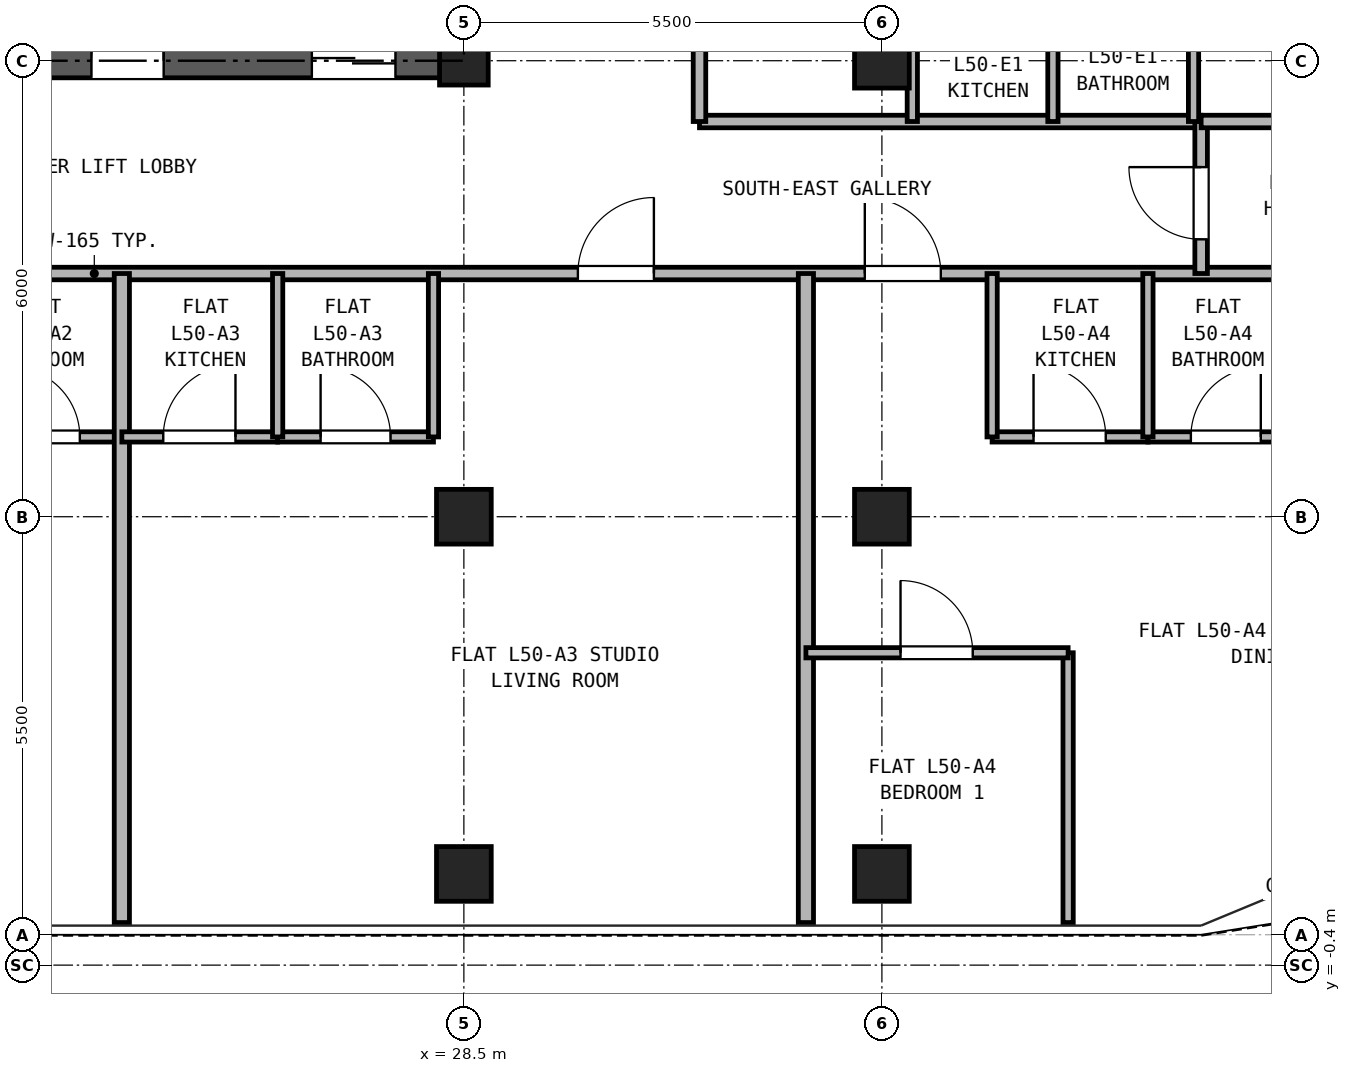
"""IFC4 building model, lengths in metres.
Left out: names, types, materials, properties, quantities, classifications, styles, units other than length and angle.
Written with IfcOpenShell. Run it as: python <this file> out.ifc"""

import sys

from ifc_helpers import new_model, si_unit, direction, frame, frame_2d, origin, origin_2d, place, context, subcontext, project, spatial, rectangle, hollow_rectangle, extrude, source, transform, mapped, element, fill, save


model = new_model("IFC4")
c1 = context("Model", 3, precision=1e-05, world=origin(), true_north=direction((0.0, 1.0)))
c2 = subcontext(c1, "Body", "Model", "MODEL_VIEW")
j1 = project(units=[si_unit("LENGTHUNIT", "METRE"), si_unit("PLANEANGLEUNIT", "RADIAN")], contexts=[c1])
p1 = place(None, origin())
s1 = spatial("IfcSite", under=j1, at=p1, CompositionType="ELEMENT")
p2 = place(p1, origin())
s2 = spatial("IfcBuilding", under=s1, at=p2, CompositionType="ELEMENT")
p3 = place(p2, frame((0.0, 0.0, 178.5)))
s3 = spatial("IfcBuildingStorey", under=s2, at=p3, CompositionType="ELEMENT", Elevation=178.5)
m1 = source(origin(), c2, "Body", "SweptSolid", [
    extrude(hollow_rectangle(XDim=0.72, YDim=0.72, WallThickness=0.04, at=origin_2d()), origin(), (0.0, 0.0, 1.0), 2.95),
])
for number, where, z_axis, x_axis in (
    (1, (28.5, 0.8, 0.0), (0.0, 0.0, 1.0), (1.0, 0.0, 0.0)),
    (2, (34.0, 0.8, 0.0), (0.0, 0.0, 1.0), (1.0, 0.0, 0.0)),
    (3, (28.5, 5.5, 0.0), (0.0, 0.0, 1.0), (1.0, 0.0, 0.0)),
):
    element("IfcColumn", number, at=place(p3, frame(where, z_axis=z_axis, x_axis=x_axis)), inside=s3, PredefinedType="COLUMN", context=c2, shape_type="MappedRepresentation", body=[
        mapped(m1, transform((0.0, 0.0, 0.0), x_axis=(1.0, 0.0, 0.0), y_axis=(0.0, 1.0, 0.0), z_axis=(0.0, 0.0, 1.0), scale=1.0)),
    ])
m2 = source(origin(), c2, "Body", "SweptSolid", [
    extrude(hollow_rectangle(XDim=0.64, YDim=0.64, WallThickness=0.035, at=origin_2d()), origin(), (0.0, 0.0, 1.0), 2.95),
])
p4 = place(p3, frame((28.5, 11.5, 0.0), z_axis=(0.0, 0.0, 1.0), x_axis=(1.0, 0.0, 0.0)))
e4 = element("IfcColumn", 4, at=p4, inside=s3, PredefinedType="COLUMN", context=c2, shape_type="MappedRepresentation", body=[
    mapped(m2, transform((0.0, 0.0, 0.0), x_axis=(1.0, 0.0, 0.0), y_axis=(0.0, 1.0, 0.0), z_axis=(0.0, 0.0, 1.0), scale=1.0)),
])
for number, where, z_axis, x_axis in (
    (5, (34.0, 5.5, 0.0), (0.0, 0.0, 1.0), (1.0, 0.0, 0.0)),
    (6, (34.0, 11.5, 0.0), (0.0, 0.0, 1.0), (1.0, 0.0, 0.0)),
):
    element("IfcColumn", number, at=place(p3, frame(where, z_axis=z_axis, x_axis=x_axis)), inside=s3, PredefinedType="COLUMN", context=c2, shape_type="MappedRepresentation", body=[
        mapped(m1, transform((0.0, 0.0, 0.0), x_axis=(1.0, 0.0, 0.0), y_axis=(0.0, 1.0, 0.0), z_axis=(0.0, 0.0, 1.0), scale=1.0)),
    ])
p5 = place(p3, frame((18.275, 11.5, 0.0), z_axis=(0.0, 0.0, 1.0), x_axis=(1.0, 0.0, 0.0)))
e7 = element("IfcWall", 7, at=p5, inside=s3, PredefinedType="SHEAR", context=c2, shape_type="SweptSolid", body=[
    extrude(rectangle(XDim=10.45, YDim=0.45, at=frame_2d((5.225, 0.0))), origin(), (0.0, 0.0, 1.0), 2.95),
])
p6 = place(p5, frame((1.825, 0.0, 0.0)))
e8 = element("IfcOpeningElement", 8, at=p6, cuts=e7, PredefinedType="OPENING", context=c2, shape_type="SweptSolid", body=[
    extrude(rectangle(XDim=0.95, YDim=2.15, at=frame_2d((0.475, 1.075))), frame((0.0, 0.235, 0.0), z_axis=(0.0, -1.0, 0.0), x_axis=(1.0, 0.0, 0.0)), (0.0, 0.0, 1.0), 0.47),
])
p7 = place(p5, frame((5.325, 0.0, 0.0)))
e9 = element("IfcOpeningElement", 9, at=p7, cuts=e7, PredefinedType="OPENING", context=c2, shape_type="SweptSolid", body=[
    extrude(rectangle(XDim=0.95, YDim=2.15, at=frame_2d((0.475, 1.075))), frame((0.0, 0.235, 0.0), z_axis=(0.0, -1.0, 0.0), x_axis=(1.0, 0.0, 0.0)), (0.0, 0.0, 1.0), 0.47),
])
p8 = place(p5, frame((8.225, 0.0, 0.0)))
e10 = element("IfcOpeningElement", 10, at=p8, cuts=e7, PredefinedType="OPENING", context=c2, shape_type="SweptSolid", body=[
    extrude(rectangle(XDim=1.1, YDim=2.25, at=frame_2d((0.55, 1.125))), frame((0.0, 0.235, 0.0), z_axis=(0.0, -1.0, 0.0), x_axis=(1.0, 0.0, 0.0)), (0.0, 0.0, 1.0), 0.47),
])
p9 = place(p3, frame((0.16, 8.7, 0.0), z_axis=(0.0, 0.0, 1.0), x_axis=(1.0, 0.0, 0.0)))
e11 = element("IfcWall", 11, at=p9, inside=s3, PredefinedType="PARTITIONING", context=c2, shape_type="SweptSolid", body=[
    extrude(rectangle(XDim=41.48, YDim=0.165, at=frame_2d((20.74, 0.0))), origin(), (0.0, 0.0, 1.0), 2.583),
])
p10 = place(p9, frame((11.815, 0.0, 0.0)))
e12 = element("IfcOpeningElement", 12, at=p10, cuts=e11, PredefinedType="OPENING", context=c2, shape_type="SweptSolid", body=[
    extrude(rectangle(XDim=1.0, YDim=2.15, at=frame_2d((0.5, 1.075))), frame((0.0, 0.093, 0.0), z_axis=(0.0, -1.0, 0.0), x_axis=(1.0, 0.0, 0.0)), (0.0, 0.0, 1.0), 0.185),
])
p11 = place(p9, frame((16.115, 0.0, 0.0)))
e13 = element("IfcOpeningElement", 13, at=p11, cuts=e11, PredefinedType="OPENING", context=c2, shape_type="SweptSolid", body=[
    extrude(rectangle(XDim=1.0, YDim=2.15, at=frame_2d((0.5, 1.075))), frame((0.0, 0.093, 0.0), z_axis=(0.0, -1.0, 0.0), x_axis=(1.0, 0.0, 0.0)), (0.0, 0.0, 1.0), 0.185),
])
p12 = place(p9, frame((29.84, 0.0, 0.0)))
e14 = element("IfcOpeningElement", 14, at=p12, cuts=e11, PredefinedType="OPENING", context=c2, shape_type="SweptSolid", body=[
    extrude(rectangle(XDim=1.0, YDim=2.15, at=frame_2d((0.5, 1.075))), frame((0.0, 0.093, 0.0), z_axis=(0.0, -1.0, 0.0), x_axis=(1.0, 0.0, 0.0)), (0.0, 0.0, 1.0), 0.185),
])
p13 = place(p9, frame((33.615, 0.0, 0.0)))
e15 = element("IfcOpeningElement", 15, at=p13, cuts=e11, PredefinedType="OPENING", context=c2, shape_type="SweptSolid", body=[
    extrude(rectangle(XDim=1.0, YDim=2.15, at=frame_2d((0.5, 1.075))), frame((0.0, 0.093, 0.0), z_axis=(0.0, -1.0, 0.0), x_axis=(1.0, 0.0, 0.0)), (0.0, 0.0, 1.0), 0.185),
])
p14 = place(p3, frame((31.6, 10.7, 0.0), z_axis=(0.0, 0.0, 1.0), x_axis=(1.0, 0.0, 0.0)))
e16 = element("IfcWall", 16, at=p14, inside=s3, PredefinedType="PARTITIONING", context=c2, shape_type="SweptSolid", body=[
    extrude(rectangle(XDim=6.6, YDim=0.165, at=frame_2d((3.3, 0.0))), origin(), (0.0, 0.0, 1.0), 2.95),
])
p15 = place(p3, frame((38.2, 8.7, 0.0), z_axis=(0.0, 0.0, 1.0), x_axis=(0.0, 1.0, 0.0)))
e17 = element("IfcWall", 17, at=p15, inside=s3, PredefinedType="PARTITIONING", context=c2, shape_type="SweptSolid", body=[
    extrude(rectangle(XDim=2.0, YDim=0.165, at=frame_2d((1.0, 0.0))), origin(), (0.0, 0.0, 1.0), 2.95),
])
p16 = place(p15, frame((0.45, 0.0, 0.0)))
e18 = element("IfcOpeningElement", 18, at=p16, cuts=e17, PredefinedType="OPENING", context=c2, shape_type="SweptSolid", body=[
    extrude(rectangle(XDim=0.95, YDim=2.15, at=frame_2d((0.475, 1.075))), frame((0.0, 0.093, 0.0), z_axis=(0.0, -1.0, 0.0), x_axis=(1.0, 0.0, 0.0)), (0.0, 0.0, 1.0), 0.185),
])
p17 = place(p3, frame((31.6, 10.7, 0.0), z_axis=(0.0, 0.0, 1.0), x_axis=(0.0, 1.0, 0.0)))
e19 = element("IfcWall", 19, at=p17, inside=s3, PredefinedType="PARTITIONING", context=c2, shape_type="SweptSolid", body=[
    extrude(rectangle(XDim=24.44, YDim=0.165, at=frame_2d((12.22, 0.0))), origin(), (0.0, 0.0, 1.0), 2.95),
])
p18 = place(p17, frame((3.25, 0.0, 0.0)))
e20 = element("IfcOpeningElement", 20, at=p18, cuts=e19, PredefinedType="OPENING", context=c2, shape_type="SweptSolid", body=[
    extrude(rectangle(XDim=1.0, YDim=2.15, at=frame_2d((0.5, 1.075))), frame((0.0, 0.093, 0.0), z_axis=(0.0, -1.0, 0.0), x_axis=(1.0, 0.0, 0.0)), (0.0, 0.0, 1.0), 0.185),
])
p19 = place(p17, frame((11.15, 0.0, 0.0)))
e21 = element("IfcOpeningElement", 21, at=p19, cuts=e19, PredefinedType="OPENING", context=c2, shape_type="SweptSolid", body=[
    extrude(rectangle(XDim=1.0, YDim=2.15, at=frame_2d((0.5, 1.075))), frame((0.0, 0.093, 0.0), z_axis=(0.0, -1.0, 0.0), x_axis=(1.0, 0.0, 0.0)), (0.0, 0.0, 1.0), 0.185),
])
p20 = place(p17, frame((17.7, 0.0, 0.0)))
e22 = element("IfcOpeningElement", 22, at=p20, cuts=e19, PredefinedType="OPENING", context=c2, shape_type="SweptSolid", body=[
    extrude(rectangle(XDim=1.0, YDim=2.15, at=frame_2d((0.5, 1.075))), frame((0.0, 0.093, 0.0), z_axis=(0.0, -1.0, 0.0), x_axis=(1.0, 0.0, 0.0)), (0.0, 0.0, 1.0), 0.185),
])
p21 = place(p3, frame((21.975, 6.55, 0.0), z_axis=(0.0, 0.0, 1.0), x_axis=(1.0, 0.0, 0.0)))
e23 = element("IfcWall", 23, at=p21, inside=s3, PredefinedType="PARTITIONING", context=c2, shape_type="SweptSolid", body=[
    extrude(rectangle(XDim=2.025, YDim=0.135, at=frame_2d((1.012, 0.0))), origin(), (0.0, 0.0, 1.0), 2.95),
])
p22 = place(p21, frame((0.552, 0.0, 0.0)))
e24 = element("IfcOpeningElement", 24, at=p22, cuts=e23, PredefinedType="OPENING", context=c2, shape_type="SweptSolid", body=[
    extrude(rectangle(XDim=0.92, YDim=2.1, at=frame_2d((0.46, 1.05))), frame((0.0, 0.077, 0.0), z_axis=(0.0, -1.0, 0.0), x_axis=(1.0, 0.0, 0.0)), (0.0, 0.0, 1.0), 0.155),
])
p23 = place(p3, frame((24.0, 0.16, 0.0), z_axis=(0.0, 0.0, 1.0), x_axis=(0.0, 1.0, 0.0)))
e25 = element("IfcWall", 25, at=p23, inside=s3, PredefinedType="PARTITIONING", context=c2, shape_type="SweptSolid", body=[
    extrude(rectangle(XDim=8.54, YDim=0.2, at=frame_2d((4.27, 0.0))), origin(), (0.0, 0.0, 1.0), 2.95),
])
p24 = place(p3, frame((24.0, 6.55, 0.0), z_axis=(0.0, 0.0, 1.0), x_axis=(1.0, 0.0, 0.0)))
e26 = element("IfcWall", 26, at=p24, inside=s3, PredefinedType="PARTITIONING", context=c2, shape_type="SweptSolid", body=[
    extrude(rectangle(XDim=2.05, YDim=0.135, at=frame_2d((1.025, 0.0))), origin(), (0.0, 0.0, 1.0), 2.95),
])
p25 = place(p24, frame((0.545, 0.0, 0.0)))
e27 = element("IfcOpeningElement", 27, at=p25, cuts=e26, PredefinedType="OPENING", context=c2, shape_type="SweptSolid", body=[
    extrude(rectangle(XDim=0.95, YDim=2.15, at=frame_2d((0.475, 1.075))), frame((0.0, 0.077, 0.0), z_axis=(0.0, -1.0, 0.0), x_axis=(1.0, 0.0, 0.0)), (0.0, 0.0, 1.0), 0.155),
])
p26 = place(p3, frame((26.05, 6.55, 0.0), z_axis=(0.0, 0.0, 1.0), x_axis=(1.0, 0.0, 0.0)))
e28 = element("IfcWall", 28, at=p26, inside=s3, PredefinedType="PARTITIONING", context=c2, shape_type="SweptSolid", body=[
    extrude(rectangle(XDim=2.05, YDim=0.135, at=frame_2d((1.025, 0.0))), origin(), (0.0, 0.0, 1.0), 2.95),
])
p27 = place(p26, frame((0.565, 0.0, 0.0)))
e29 = element("IfcOpeningElement", 29, at=p27, cuts=e28, PredefinedType="OPENING", context=c2, shape_type="SweptSolid", body=[
    extrude(rectangle(XDim=0.92, YDim=2.1, at=frame_2d((0.46, 1.05))), frame((0.0, 0.077, 0.0), z_axis=(0.0, -1.0, 0.0), x_axis=(1.0, 0.0, 0.0)), (0.0, 0.0, 1.0), 0.155),
])
for number, where, z_axis, x_axis in (
    (30, (26.05, 6.55, 0.0), (0.0, 0.0, 1.0), (0.0, 1.0, 0.0)),
    (31, (28.1, 6.55, 0.0), (0.0, 0.0, 1.0), (0.0, 1.0, 0.0)),
):
    element("IfcWall", number, at=place(p3, frame(where, z_axis=z_axis, x_axis=x_axis)), inside=s3, PredefinedType="PARTITIONING", context=c2, shape_type="SweptSolid", body=[
        extrude(rectangle(XDim=2.15, YDim=0.135, at=frame_2d((1.075, 0.0))), origin(), (0.0, 0.0, 1.0), 2.95),
    ])
p28 = place(p3, frame((33.0, 0.16, 0.0), z_axis=(0.0, 0.0, 1.0), x_axis=(0.0, 1.0, 0.0)))
e32 = element("IfcWall", 32, at=p28, inside=s3, PredefinedType="PARTITIONING", context=c2, shape_type="SweptSolid", body=[
    extrude(rectangle(XDim=8.54, YDim=0.2, at=frame_2d((4.27, 0.0))), origin(), (0.0, 0.0, 1.0), 2.95),
])
p29 = place(p3, frame((35.45, 6.55, 0.0), z_axis=(0.0, 0.0, 1.0), x_axis=(1.0, 0.0, 0.0)))
e33 = element("IfcWall", 33, at=p29, inside=s3, PredefinedType="PARTITIONING", context=c2, shape_type="SweptSolid", body=[
    extrude(rectangle(XDim=2.05, YDim=0.135, at=frame_2d((1.025, 0.0))), origin(), (0.0, 0.0, 1.0), 2.95),
])
p30 = place(p29, frame((0.545, 0.0, 0.0)))
e34 = element("IfcOpeningElement", 34, at=p30, cuts=e33, PredefinedType="OPENING", context=c2, shape_type="SweptSolid", body=[
    extrude(rectangle(XDim=0.95, YDim=2.15, at=frame_2d((0.475, 1.075))), frame((0.0, 0.077, 0.0), z_axis=(0.0, -1.0, 0.0), x_axis=(1.0, 0.0, 0.0)), (0.0, 0.0, 1.0), 0.155),
])
p31 = place(p3, frame((37.5, 6.55, 0.0), z_axis=(0.0, 0.0, 1.0), x_axis=(1.0, 0.0, 0.0)))
e35 = element("IfcWall", 35, at=p31, inside=s3, PredefinedType="PARTITIONING", context=c2, shape_type="SweptSolid", body=[
    extrude(rectangle(XDim=2.05, YDim=0.135, at=frame_2d((1.025, 0.0))), origin(), (0.0, 0.0, 1.0), 2.95),
])
p32 = place(p31, frame((0.565, 0.0, 0.0)))
e36 = element("IfcOpeningElement", 36, at=p32, cuts=e35, PredefinedType="OPENING", context=c2, shape_type="SweptSolid", body=[
    extrude(rectangle(XDim=0.92, YDim=2.1, at=frame_2d((0.46, 1.05))), frame((0.0, 0.077, 0.0), z_axis=(0.0, -1.0, 0.0), x_axis=(1.0, 0.0, 0.0)), (0.0, 0.0, 1.0), 0.155),
])
for number, where, z_axis, x_axis in (
    (37, (35.45, 6.55, 0.0), (0.0, 0.0, 1.0), (0.0, 1.0, 0.0)),
    (38, (37.5, 6.55, 0.0), (0.0, 0.0, 1.0), (0.0, 1.0, 0.0)),
):
    element("IfcWall", number, at=place(p3, frame(where, z_axis=z_axis, x_axis=x_axis)), inside=s3, PredefinedType="PARTITIONING", context=c2, shape_type="SweptSolid", body=[
        extrude(rectangle(XDim=2.15, YDim=0.135, at=frame_2d((1.075, 0.0))), origin(), (0.0, 0.0, 1.0), 2.95),
    ])
p33 = place(p3, frame((36.45, 0.16, 0.0), z_axis=(0.0, 0.0, 1.0), x_axis=(0.0, 1.0, 0.0)))
e39 = element("IfcWall", 39, at=p33, inside=s3, PredefinedType="PARTITIONING", context=c2, shape_type="SweptSolid", body=[
    extrude(rectangle(XDim=3.55, YDim=0.135, at=frame_2d((1.775, 0.0))), origin(), (0.0, 0.0, 1.0), 2.95),
])
p34 = place(p3, frame((33.0, 3.71, 0.0), z_axis=(0.0, 0.0, 1.0), x_axis=(1.0, 0.0, 0.0)))
e40 = element("IfcWall", 40, at=p34, inside=s3, PredefinedType="PARTITIONING", context=c2, shape_type="SweptSolid", body=[
    extrude(rectangle(XDim=3.45, YDim=0.135, at=frame_2d((1.725, 0.0))), origin(), (0.0, 0.0, 1.0), 2.95),
])
p35 = place(p34, frame((1.245, 0.0, 0.0)))
e41 = element("IfcOpeningElement", 41, at=p35, cuts=e40, PredefinedType="OPENING", context=c2, shape_type="SweptSolid", body=[
    extrude(rectangle(XDim=0.95, YDim=2.15, at=frame_2d((0.475, 1.075))), frame((0.0, 0.077, 0.0), z_axis=(0.0, -1.0, 0.0), x_axis=(1.0, 0.0, 0.0)), (0.0, 0.0, 1.0), 0.155),
])
p36 = place(p3, frame((38.2, 10.7, 0.0), z_axis=(0.0, 0.0, 1.0), x_axis=(1.0, 0.0, 0.0)))
e42 = element("IfcWall", 42, at=p36, inside=s3, PredefinedType="PARTITIONING", context=c2, shape_type="SweptSolid", body=[
    extrude(rectangle(XDim=3.44, YDim=0.165, at=frame_2d((1.72, 0.0))), origin(), (0.0, 0.0, 1.0), 2.95),
])
for number, where, z_axis, x_axis in (
    (43, (34.4, 10.7, 0.0), (0.0, 0.0, 1.0), (0.0, 1.0, 0.0)),
    (44, (36.25, 10.7, 0.0), (0.0, 0.0, 1.0), (0.0, 1.0, 0.0)),
    (45, (38.1, 10.7, 0.0), (0.0, 0.0, 1.0), (0.0, 1.0, 0.0)),
):
    element("IfcWall", number, at=place(p3, frame(where, z_axis=z_axis, x_axis=x_axis)), inside=s3, PredefinedType="PARTITIONING", context=c2, shape_type="SweptSolid", body=[
        extrude(rectangle(XDim=2.15, YDim=0.135, at=frame_2d((1.075, 0.0))), origin(), (0.0, 0.0, 1.0), 2.95),
    ])
p37 = place(p7, frame((0.95, 0.0, 0.0), z_axis=(0.0, 0.0, 1.0), x_axis=(-1.0, 0.0, 0.0)))
e46 = element("IfcDoor", 46, at=p37, inside=s3, OperationType="SINGLE_SWING_RIGHT", PredefinedType="DOOR", context=c2, shape_type="SweptSolid", body=[
    extrude(rectangle(XDim=0.95, YDim=2.15, at=frame_2d((0.475, 1.075))), frame((0.0, 0.025, 0.0), z_axis=(0.0, -1.0, 0.0), x_axis=(1.0, 0.0, 0.0)), (0.0, 0.0, 1.0), 0.05),
])
fill(e9, e46)
p38 = place(p8, frame((1.1, 0.0, 0.0), z_axis=(0.0, 0.0, 1.0), x_axis=(-1.0, 0.0, 0.0)))
e47 = element("IfcDoor", 47, at=p38, inside=s3, OperationType="DOUBLE_DOOR_SLIDING", PredefinedType="DOOR", context=c2, shape_type="SweptSolid", body=[
    extrude(rectangle(XDim=1.1, YDim=2.25, at=frame_2d((0.55, 1.125))), frame((0.0, 0.025, 0.0), z_axis=(0.0, -1.0, 0.0), x_axis=(1.0, 0.0, 0.0)), (0.0, 0.0, 1.0), 0.05),
])
fill(e10, e47)
p39 = place(p22, origin())
e48 = element("IfcDoor", 48, at=p39, inside=s3, OperationType="SINGLE_SWING_LEFT", PredefinedType="DOOR", context=c2, shape_type="SweptSolid", body=[
    extrude(rectangle(XDim=0.92, YDim=2.1, at=frame_2d((0.46, 1.05))), frame((0.0, 0.025, 0.0), z_axis=(0.0, -1.0, 0.0), x_axis=(1.0, 0.0, 0.0)), (0.0, 0.0, 1.0), 0.05),
])
fill(e24, e48)
p40 = place(p25, origin())
e49 = element("IfcDoor", 49, at=p40, inside=s3, OperationType="SINGLE_SWING_RIGHT", PredefinedType="DOOR", context=c2, shape_type="SweptSolid", body=[
    extrude(rectangle(XDim=0.95, YDim=2.15, at=frame_2d((0.475, 1.075))), frame((0.0, 0.025, 0.0), z_axis=(0.0, -1.0, 0.0), x_axis=(1.0, 0.0, 0.0)), (0.0, 0.0, 1.0), 0.05),
])
fill(e27, e49)
p41 = place(p27, origin())
e50 = element("IfcDoor", 50, at=p41, inside=s3, OperationType="SINGLE_SWING_LEFT", PredefinedType="DOOR", context=c2, shape_type="SweptSolid", body=[
    extrude(rectangle(XDim=0.92, YDim=2.1, at=frame_2d((0.46, 1.05))), frame((0.0, 0.025, 0.0), z_axis=(0.0, -1.0, 0.0), x_axis=(1.0, 0.0, 0.0)), (0.0, 0.0, 1.0), 0.05),
])
fill(e29, e50)
p42 = place(p12, frame((1.0, 0.0, 0.0), z_axis=(0.0, 0.0, 1.0), x_axis=(-1.0, 0.0, 0.0)))
e51 = element("IfcDoor", 51, at=p42, inside=s3, OperationType="SINGLE_SWING_RIGHT", PredefinedType="DOOR", context=c2, shape_type="SweptSolid", body=[
    extrude(rectangle(XDim=1.0, YDim=2.15, at=frame_2d((0.5, 1.075))), frame((0.0, 0.025, 0.0), z_axis=(0.0, -1.0, 0.0), x_axis=(1.0, 0.0, 0.0)), (0.0, 0.0, 1.0), 0.05),
])
fill(e14, e51)
p43 = place(p30, origin())
e52 = element("IfcDoor", 52, at=p43, inside=s3, OperationType="SINGLE_SWING_LEFT", PredefinedType="DOOR", context=c2, shape_type="SweptSolid", body=[
    extrude(rectangle(XDim=0.95, YDim=2.15, at=frame_2d((0.475, 1.075))), frame((0.0, 0.025, 0.0), z_axis=(0.0, -1.0, 0.0), x_axis=(1.0, 0.0, 0.0)), (0.0, 0.0, 1.0), 0.05),
])
fill(e34, e52)
p44 = place(p32, origin())
e53 = element("IfcDoor", 53, at=p44, inside=s3, OperationType="SINGLE_SWING_RIGHT", PredefinedType="DOOR", context=c2, shape_type="SweptSolid", body=[
    extrude(rectangle(XDim=0.92, YDim=2.1, at=frame_2d((0.46, 1.05))), frame((0.0, 0.025, 0.0), z_axis=(0.0, -1.0, 0.0), x_axis=(1.0, 0.0, 0.0)), (0.0, 0.0, 1.0), 0.05),
])
fill(e36, e53)
p45 = place(p35, frame((0.95, 0.0, 0.0), z_axis=(0.0, 0.0, 1.0), x_axis=(-1.0, 0.0, 0.0)))
e54 = element("IfcDoor", 54, at=p45, inside=s3, OperationType="SINGLE_SWING_LEFT", PredefinedType="DOOR", context=c2, shape_type="SweptSolid", body=[
    extrude(rectangle(XDim=0.95, YDim=2.15, at=frame_2d((0.475, 1.075))), frame((0.0, 0.025, 0.0), z_axis=(0.0, -1.0, 0.0), x_axis=(1.0, 0.0, 0.0)), (0.0, 0.0, 1.0), 0.05),
])
fill(e41, e54)
p46 = place(p13, frame((1.0, 0.0, 0.0), z_axis=(0.0, 0.0, 1.0), x_axis=(-1.0, 0.0, 0.0)))
e55 = element("IfcDoor", 55, at=p46, inside=s3, OperationType="SINGLE_SWING_LEFT", PredefinedType="DOOR", context=c2, shape_type="SweptSolid", body=[
    extrude(rectangle(XDim=1.0, YDim=2.15, at=frame_2d((0.5, 1.075))), frame((0.0, 0.025, 0.0), z_axis=(0.0, -1.0, 0.0), x_axis=(1.0, 0.0, 0.0)), (0.0, 0.0, 1.0), 0.05),
])
fill(e15, e55)
p47 = place(p16, origin())
e56 = element("IfcDoor", 56, at=p47, inside=s3, OperationType="SINGLE_SWING_RIGHT", PredefinedType="DOOR", context=c2, shape_type="SweptSolid", body=[
    extrude(rectangle(XDim=0.95, YDim=2.15, at=frame_2d((0.475, 1.075))), frame((0.0, 0.025, 0.0), z_axis=(0.0, -1.0, 0.0), x_axis=(1.0, 0.0, 0.0)), (0.0, 0.0, 1.0), 0.05),
])
fill(e18, e56)
save(model, sys.argv[1])
